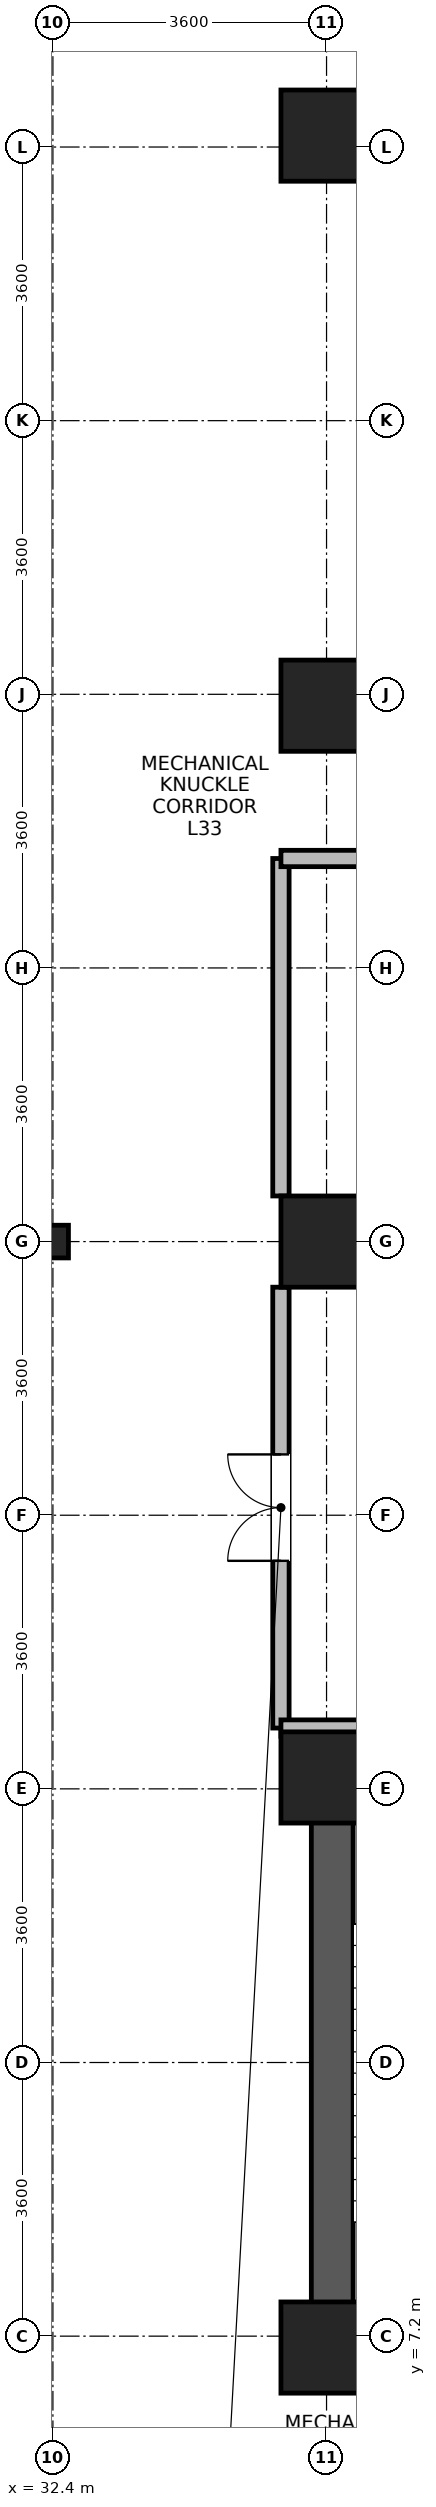
"""IFC4 building model, lengths in metres.
Left out: names, types, materials, properties, quantities, classifications, styles, units other than length and angle.
Written with IfcOpenShell. Run it as: python <this file> out.ifc"""

import sys

from ifc_helpers import new_model, si_unit, direction, frame, frame_2d, origin, origin_2d, place, context, subcontext, project, spatial, rectangle, i_section, extrude, source, transform, mapped, element, fill, save


model = new_model("IFC4")
c1 = context("Model", 3, precision=1e-05, world=origin(), true_north=direction((0.0, 1.0)))
c2 = subcontext(c1, "Body", "Model", "MODEL_VIEW")
j1 = project(units=[si_unit("LENGTHUNIT", "METRE"), si_unit("PLANEANGLEUNIT", "RADIAN")], contexts=[c1])
p1 = place(None, origin())
s1 = spatial("IfcSite", under=j1, at=p1, CompositionType="ELEMENT")
p2 = place(p1, origin())
s2 = spatial("IfcBuilding", under=s1, at=p2, CompositionType="ELEMENT")
p3 = place(p2, frame((0.0, 0.0, 130.4)))
s3 = spatial("IfcBuildingStorey", under=s2, at=p3, CompositionType="ELEMENT", Elevation=130.4)
p4 = place(p3, frame((36.075, 6.75, 0.0), z_axis=(0.0, 0.0, 1.0), x_axis=(0.0, 1.0, 0.0)))
e1 = element("IfcWall", 1, at=p4, inside=s3, PredefinedType="SHEAR", context=c2, shape_type="SweptSolid", body=[
    extrude(rectangle(XDim=8.1, YDim=0.55, at=frame_2d((4.05, 0.0))), origin(), (0.0, 0.0, 1.0), 4.78),
])
for number, where, z_axis, x_axis in (
    (2, (36.35, 7.025, 0.0), (0.0, 0.0, 1.0), (1.0, 0.0, 0.0)),
    (3, (36.35, 14.575, 0.0), (0.0, 0.0, 1.0), (1.0, 0.0, 0.0)),
):
    element("IfcWall", number, at=place(p3, frame(where, z_axis=z_axis, x_axis=x_axis)), inside=s3, PredefinedType="SHEAR", context=c2, shape_type="SweptSolid", body=[
        extrude(rectangle(XDim=3.2, YDim=0.55, at=frame_2d((1.6, 0.0))), origin(), (0.0, 0.0, 1.0), 4.78),
    ])
m1 = source(origin(), c2, "Body", "SweptSolid", [
    extrude(rectangle(XDim=1.2, YDim=1.2, at=origin_2d()), origin(), (0.0, 0.0, 1.0), 5.2),
])
for number, where, z_axis, x_axis in (
    (4, (36.0, 21.6, 0.0), (0.0, 0.0, 1.0), (1.0, 0.0, 0.0)),
    (5, (36.0, 28.65, 0.0), (0.0, 0.0, 1.0), (1.0, 0.0, 0.0)),
    (6, (36.0, 36.15, 0.0), (0.0, 0.0, 1.0), (1.0, 0.0, 0.0)),
    (7, (36.0, 7.05, 0.0), (0.0, 0.0, 1.0), (1.0, 0.0, 0.0)),
    (8, (36.0, 14.55, 0.0), (0.0, 0.0, 1.0), (1.0, 0.0, 0.0)),
):
    element("IfcColumn", number, at=place(p3, frame(where, z_axis=z_axis, x_axis=x_axis)), inside=s3, PredefinedType="COLUMN", context=c2, shape_type="MappedRepresentation", body=[
        mapped(m1, transform((0.0, 0.0, 0.0), x_axis=(1.0, 0.0, 0.0), y_axis=(0.0, 1.0, 0.0), z_axis=(0.0, 0.0, 1.0), scale=1.0)),
    ])
m2 = source(origin(), c2, "Body", "SweptSolid", [
    extrude(i_section(OverallWidth=0.409, OverallDepth=0.43, WebThickness=0.024, FlangeThickness=0.033, FilletRadius=0.015, at=origin_2d()), origin(), (0.0, 0.0, 1.0), 5.2),
])
p5 = place(p3, frame((32.4, 21.6, 0.0), z_axis=(0.0, 0.0, 1.0), x_axis=(1.0, 0.0, 0.0)))
e9 = element("IfcColumn", 9, at=p5, inside=s3, PredefinedType="COLUMN", context=c2, shape_type="MappedRepresentation", body=[
    mapped(m2, transform((0.0, 0.0, 0.0), x_axis=(1.0, 0.0, 0.0), y_axis=(0.0, 1.0, 0.0), z_axis=(0.0, 0.0, 1.0), scale=1.0)),
])
p6 = place(p3, frame((35.4, 15.2, 0.0), z_axis=(0.0, 0.0, 1.0), x_axis=(0.0, 1.0, 0.0)))
e10 = element("IfcWall", 10, at=p6, inside=s3, PredefinedType="PARTITIONING", context=c2, shape_type="SweptSolid", body=[
    extrude(rectangle(XDim=5.8, YDim=0.215, at=frame_2d((2.9, 0.0))), origin(), (0.0, 0.0, 1.0), 4.76),
])
p7 = place(p6, frame((2.2, 0.0, 0.0)))
e11 = element("IfcOpeningElement", 11, at=p7, cuts=e10, PredefinedType="OPENING", context=c2, shape_type="SweptSolid", body=[
    extrude(rectangle(XDim=1.4, YDim=2.15, at=frame_2d((0.7, 1.075))), frame((0.0, 0.118, 0.0), z_axis=(0.0, -1.0, 0.0), x_axis=(1.0, 0.0, 0.0)), (0.0, 0.0, 1.0), 0.235),
])
p8 = place(p3, frame((35.4, 22.2, 0.0), z_axis=(0.0, 0.0, 1.0), x_axis=(0.0, 1.0, 0.0)))
e12 = element("IfcWall", 12, at=p8, inside=s3, PredefinedType="PARTITIONING", context=c2, shape_type="SweptSolid", body=[
    extrude(rectangle(XDim=4.44, YDim=0.215, at=frame_2d((2.22, 0.0))), origin(), (0.0, 0.0, 1.0), 4.76),
])
for number, where, z_axis, x_axis in (
    (13, (35.4, 15.2, 0.0), (0.0, 0.0, 1.0), (1.0, 0.0, 0.0)),
    (14, (35.4, 26.64, 0.0), (0.0, 0.0, 1.0), (1.0, 0.0, 0.0)),
):
    element("IfcWall", number, at=place(p3, frame(where, z_axis=z_axis, x_axis=x_axis)), inside=s3, PredefinedType="PARTITIONING", context=c2, shape_type="SweptSolid", body=[
        extrude(rectangle(XDim=25.168, YDim=0.215, at=frame_2d((12.584, 0.0))), origin(), (0.0, 0.0, 1.0), 4.76),
    ])
p9 = place(p7, origin())
e15 = element("IfcDoor", 15, at=p9, inside=s3, OperationType="DOUBLE_DOOR_SINGLE_SWING", PredefinedType="DOOR", context=c2, shape_type="SweptSolid", body=[
    extrude(rectangle(XDim=1.4, YDim=2.15, at=frame_2d((0.7, 1.075))), frame((0.0, 0.025, 0.0), z_axis=(0.0, -1.0, 0.0), x_axis=(1.0, 0.0, 0.0)), (0.0, 0.0, 1.0), 0.05),
])
fill(e11, e15)
save(model, sys.argv[1])
